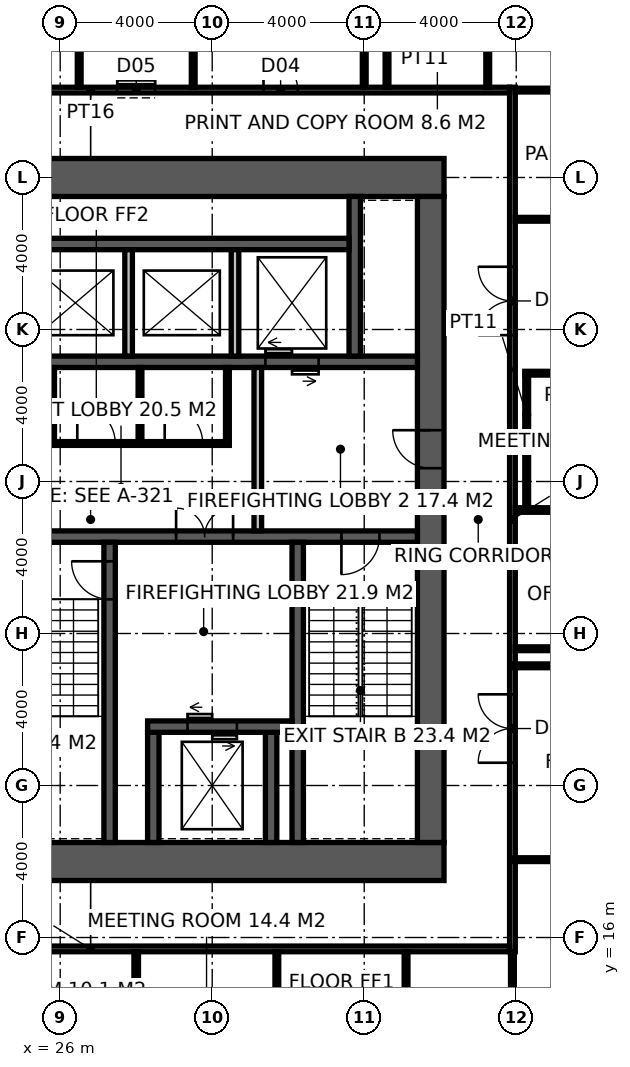
"""IFC4 building model, lengths in metres.
Left out: names, types, materials, properties, quantities, classifications, styles, units other than length and angle.
Written with IfcOpenShell. Run it as: python <this file> out.ifc"""

import sys

from ifc_helpers import new_model, si_unit, direction, frame, frame_2d, origin, place, context, subcontext, project, spatial, rectangle, extrude, element, fill, save


model = new_model("IFC4")
c1 = context("Model", 3, precision=1e-05, world=origin(), true_north=direction((0.0, 1.0)))
c2 = subcontext(c1, "Body", "Model", "MODEL_VIEW")
j1 = project(units=[si_unit("LENGTHUNIT", "METRE"), si_unit("PLANEANGLEUNIT", "RADIAN")], contexts=[c1])
p1 = place(None, origin())
s1 = spatial("IfcSite", under=j1, at=p1, CompositionType="ELEMENT")
p2 = place(p1, origin())
s2 = spatial("IfcBuilding", under=s1, at=p2, CompositionType="ELEMENT")
p3 = place(p2, frame((0.0, 0.0, 101.4)))
s3 = spatial("IfcBuildingStorey", under=s2, at=p3, CompositionType="ELEMENT", Elevation=101.4)
p4 = place(p3, frame((18.5, 18.0, -0.15), z_axis=(0.0, 0.0, 1.0), x_axis=(1.0, 0.0, 0.0)))
e1 = element("IfcWall", 1, at=p4, inside=s3, PredefinedType="SHEAR", context=c2, shape_type="SweptSolid", body=[
    extrude(rectangle(XDim=17.6, YDim=1.0, at=frame_2d((8.8, 0.0))), origin(), (0.0, 0.0, 1.0), 4.0),
])
p5 = place(p4, frame((3.45, 0.0, 0.15)))
e2 = element("IfcOpeningElement", 2, at=p5, cuts=e1, PredefinedType="OPENING", context=c2, shape_type="SweptSolid", body=[
    extrude(rectangle(XDim=1.5, YDim=2.4, at=frame_2d((0.75, 1.2))), frame((0.0, 0.51, 0.0), z_axis=(0.0, -1.0, 0.0), x_axis=(1.0, 0.0, 0.0)), (0.0, 0.0, 1.0), 1.02),
])
p6 = place(p3, frame((18.5, 36.0, -0.15), z_axis=(0.0, 0.0, 1.0), x_axis=(1.0, 0.0, 0.0)))
e3 = element("IfcWall", 3, at=p6, inside=s3, PredefinedType="SHEAR", context=c2, shape_type="SweptSolid", body=[
    extrude(rectangle(XDim=17.6, YDim=1.0, at=frame_2d((8.8, 0.0))), origin(), (0.0, 0.0, 1.0), 4.0),
])
p7 = place(p3, frame((35.75, 18.5, -0.15), z_axis=(0.0, 0.0, 1.0), x_axis=(0.0, 1.0, 0.0)))
e4 = element("IfcWall", 4, at=p7, inside=s3, PredefinedType="SHEAR", context=c2, shape_type="SweptSolid", body=[
    extrude(rectangle(XDim=17.0, YDim=0.7, at=frame_2d((8.5, 0.0))), origin(), (0.0, 0.0, 1.0), 4.0),
])
p8 = place(p7, frame((9.85, 0.0, 0.15)))
e5 = element("IfcOpeningElement", 5, at=p8, cuts=e4, PredefinedType="OPENING", context=c2, shape_type="SweptSolid", body=[
    extrude(rectangle(XDim=1.0, YDim=2.2, at=frame_2d((0.5, 1.1))), frame((0.0, 0.36, 0.0), z_axis=(0.0, -1.0, 0.0), x_axis=(1.0, 0.0, 0.0)), (0.0, 0.0, 1.0), 0.72),
])
p9 = place(p3, frame((24.15, 26.55, -0.15), z_axis=(0.0, 0.0, 1.0), x_axis=(1.0, 0.0, 0.0)))
e6 = element("IfcWall", 6, at=p9, inside=s3, PredefinedType="SHEAR", context=c2, shape_type="SweptSolid", body=[
    extrude(rectangle(XDim=11.25, YDim=0.3, at=frame_2d((5.625, 0.0))), origin(), (0.0, 0.0, 1.0), 4.0),
])
p10 = place(p9, frame((9.25, 0.0, 0.15)))
e7 = element("IfcOpeningElement", 7, at=p10, cuts=e6, PredefinedType="OPENING", context=c2, shape_type="SweptSolid", body=[
    extrude(rectangle(XDim=1.0, YDim=2.2, at=frame_2d((0.5, 1.1))), frame((0.0, 0.16, 0.0), z_axis=(0.0, -1.0, 0.0), x_axis=(1.0, 0.0, 0.0)), (0.0, 0.0, 1.0), 0.32),
])
p11 = place(p9, frame((4.9, 0.0, 0.15)))
e8 = element("IfcOpeningElement", 8, at=p11, cuts=e6, PredefinedType="OPENING", context=c2, shape_type="SweptSolid", body=[
    extrude(rectangle(XDim=1.5, YDim=2.4, at=frame_2d((0.75, 1.2))), frame((0.0, 0.16, 0.0), z_axis=(0.0, -1.0, 0.0), x_axis=(1.0, 0.0, 0.0)), (0.0, 0.0, 1.0), 0.32),
])
p12 = place(p3, frame((27.3, 18.5, -0.15), z_axis=(0.0, 0.0, 1.0), x_axis=(0.0, 1.0, 0.0)))
e9 = element("IfcWall", 9, at=p12, inside=s3, PredefinedType="SHEAR", context=c2, shape_type="SweptSolid", body=[
    extrude(rectangle(XDim=7.9, YDim=0.3, at=frame_2d((3.95, 0.0))), origin(), (0.0, 0.0, 1.0), 4.0),
])
p13 = place(p12, frame((6.4, 0.0, 0.15)))
e10 = element("IfcOpeningElement", 10, at=p13, cuts=e9, PredefinedType="OPENING", context=c2, shape_type="SweptSolid", body=[
    extrude(rectangle(XDim=1.0, YDim=2.2, at=frame_2d((0.5, 1.1))), frame((0.0, 0.16, 0.0), z_axis=(0.0, -1.0, 0.0), x_axis=(1.0, 0.0, 0.0)), (0.0, 0.0, 1.0), 0.32),
])
p14 = place(p3, frame((32.25, 18.5, -0.15), z_axis=(0.0, 0.0, 1.0), x_axis=(0.0, 1.0, 0.0)))
e11 = element("IfcWall", 11, at=p14, inside=s3, PredefinedType="SHEAR", context=c2, shape_type="SweptSolid", body=[
    extrude(rectangle(XDim=7.9, YDim=0.3, at=frame_2d((3.95, 0.0))), origin(), (0.0, 0.0, 1.0), 4.0),
])
for number, where, z_axis, x_axis in (
    (12, (28.45, 18.5, -0.15), (0.0, 0.0, 1.0), (0.0, 1.0, 0.0)),
    (13, (31.55, 18.5, -0.15), (0.0, 0.0, 1.0), (0.0, 1.0, 0.0)),
):
    element("IfcWall", number, at=place(p3, frame(where, z_axis=z_axis, x_axis=x_axis)), inside=s3, PredefinedType="SHEAR", context=c2, shape_type="SweptSolid", body=[
        extrude(rectangle(XDim=2.9, YDim=0.3, at=frame_2d((1.45, 0.0))), origin(), (0.0, 0.0, 1.0), 4.0),
    ])
p15 = place(p3, frame((28.3, 21.55, -0.15), z_axis=(0.0, 0.0, 1.0), x_axis=(1.0, 0.0, 0.0)))
e14 = element("IfcWall", 14, at=p15, inside=s3, PredefinedType="SHEAR", context=c2, shape_type="SweptSolid", body=[
    extrude(rectangle(XDim=3.8, YDim=0.3, at=frame_2d((1.9, 0.0))), origin(), (0.0, 0.0, 1.0), 4.0),
])
p16 = place(p15, frame((1.05, 0.0, 0.15)))
e15 = element("IfcOpeningElement", 15, at=p16, cuts=e14, PredefinedType="OPENING", context=c2, shape_type="SweptSolid", body=[
    extrude(rectangle(XDim=1.3, YDim=2.4, at=frame_2d((0.65, 1.2))), frame((0.0, 0.16, 0.0), z_axis=(0.0, -1.0, 0.0), x_axis=(1.0, 0.0, 0.0)), (0.0, 0.0, 1.0), 0.32),
])
p17 = place(p3, frame((24.15, 31.15, -0.15), z_axis=(0.0, 0.0, 1.0), x_axis=(1.0, 0.0, 0.0)))
e16 = element("IfcWall", 16, at=p17, inside=s3, PredefinedType="SHEAR", context=c2, shape_type="SweptSolid", body=[
    extrude(rectangle(XDim=11.25, YDim=0.3, at=frame_2d((5.625, 0.0))), origin(), (0.0, 0.0, 1.0), 4.0),
])
p18 = place(p17, frame((7.25, 0.0, 0.15)))
e17 = element("IfcOpeningElement", 17, at=p18, cuts=e16, PredefinedType="OPENING", context=c2, shape_type="SweptSolid", body=[
    extrude(rectangle(XDim=1.4, YDim=2.4, at=frame_2d((0.7, 1.2))), frame((0.0, 0.16, 0.0), z_axis=(0.0, -1.0, 0.0), x_axis=(1.0, 0.0, 0.0)), (0.0, 0.0, 1.0), 0.32),
])
p19 = place(p3, frame((33.75, 31.3, -0.15), z_axis=(0.0, 0.0, 1.0), x_axis=(0.0, 1.0, 0.0)))
e18 = element("IfcWall", 18, at=p19, inside=s3, PredefinedType="SHEAR", context=c2, shape_type="SweptSolid", body=[
    extrude(rectangle(XDim=4.2, YDim=0.3, at=frame_2d((2.1, 0.0))), origin(), (0.0, 0.0, 1.0), 4.0),
])
p20 = place(p3, frame((25.0, 34.25, -0.15), z_axis=(0.0, 0.0, 1.0), x_axis=(1.0, 0.0, 0.0)))
e19 = element("IfcWall", 19, at=p20, inside=s3, PredefinedType="SHEAR", context=c2, shape_type="SweptSolid", body=[
    extrude(rectangle(XDim=8.6, YDim=0.3, at=frame_2d((4.3, 0.0))), origin(), (0.0, 0.0, 1.0), 4.0),
])
for number, where, z_axis, x_axis in (
    (20, (27.8, 31.3, -0.15), (0.0, 0.0, 1.0), (0.0, 1.0, 0.0)),
    (21, (30.6, 31.3, -0.15), (0.0, 0.0, 1.0), (0.0, 1.0, 0.0)),
):
    element("IfcWall", number, at=place(p3, frame(where, z_axis=z_axis, x_axis=x_axis)), inside=s3, PredefinedType="SOLIDWALL", context=c2, shape_type="SweptSolid", body=[
        extrude(rectangle(XDim=2.8, YDim=0.2, at=frame_2d((1.4, 0.0))), origin(), (0.0, 0.0, 1.0), 4.0),
    ])
p21 = place(p3, frame((31.2, 26.7, 0.0), z_axis=(0.0, 0.0, 1.0), x_axis=(0.0, 1.0, 0.0)))
e22 = element("IfcWall", 22, at=p21, inside=s3, PredefinedType="SOLIDWALL", context=c2, shape_type="SweptSolid", body=[
    extrude(rectangle(XDim=4.3, YDim=0.2, at=frame_2d((2.15, 0.0))), origin(), (0.0, 0.0, 1.0), 3.85),
])
p22 = place(p3, frame((25.75, 29.0, 0.0), z_axis=(0.0, 0.0, 1.0), x_axis=(1.0, 0.0, 0.0)))
e23 = element("IfcWall", 23, at=p22, inside=s3, PredefinedType="PARTITIONING", context=c2, shape_type="SweptSolid", body=[
    extrude(rectangle(XDim=4.7, YDim=0.1, at=frame_2d((2.35, 0.0))), origin(), (0.0, 0.0, 1.0), 3.85),
])
p23 = place(p22, frame((0.7, 0.0, 0.0)))
e24 = element("IfcOpeningElement", 24, at=p23, cuts=e23, PredefinedType="OPENING", context=c2, shape_type="SweptSolid", body=[
    extrude(rectangle(XDim=1.0, YDim=2.2, at=frame_2d((0.5, 1.1))), frame((0.0, 0.06, 0.0), z_axis=(0.0, -1.0, 0.0), x_axis=(1.0, 0.0, 0.0)), (0.0, 0.0, 1.0), 0.12),
])
p24 = place(p22, frame((3.0, 0.0, 0.0)))
e25 = element("IfcOpeningElement", 25, at=p24, cuts=e23, PredefinedType="OPENING", context=c2, shape_type="SweptSolid", body=[
    extrude(rectangle(XDim=1.0, YDim=2.2, at=frame_2d((0.5, 1.1))), frame((0.0, 0.06, 0.0), z_axis=(0.0, -1.0, 0.0), x_axis=(1.0, 0.0, 0.0)), (0.0, 0.0, 1.0), 0.12),
])
for number, where, z_axis, x_axis in (
    (26, (25.8, 29.05, 0.0), (0.0, 0.0, 1.0), (0.0, 1.0, 0.0)),
    (27, (30.4, 29.05, 0.0), (0.0, 0.0, 1.0), (0.0, 1.0, 0.0)),
    (28, (28.1, 29.05, 0.0), (0.0, 0.0, 1.0), (0.0, 1.0, 0.0)),
):
    element("IfcWall", number, at=place(p3, frame(where, z_axis=z_axis, x_axis=x_axis)), inside=s3, PredefinedType="PARTITIONING", context=c2, shape_type="SweptSolid", body=[
        extrude(rectangle(XDim=1.95, YDim=0.1, at=frame_2d((0.975, 0.0))), origin(), (0.0, 0.0, 1.0), 3.85),
    ])
p25 = place(p3, frame((37.9, 15.625, 0.0), z_axis=(0.0, 0.0, 1.0), x_axis=(0.0, 1.0, 0.0)))
e29 = element("IfcWall", 29, at=p25, inside=s3, PredefinedType="PARTITIONING", context=c2, shape_type="SweptSolid", body=[
    extrude(rectangle(XDim=22.75, YDim=0.15, at=frame_2d((11.375, 0.0))), origin(), (0.0, 0.0, 1.0), 2.65),
])
p26 = place(p25, frame((4.974, 0.0, 0.0)))
e30 = element("IfcOpeningElement", 30, at=p26, cuts=e29, PredefinedType="OPENING", context=c2, shape_type="SweptSolid", body=[
    extrude(rectangle(XDim=1.8, YDim=2.4, at=frame_2d((0.9, 1.2))), frame((0.0, 0.085, 0.0), z_axis=(0.0, -1.0, 0.0), x_axis=(1.0, 0.0, 0.0)), (0.0, 0.0, 1.0), 0.17),
])
p27 = place(p25, frame((16.226, 0.0, 0.0)))
e31 = element("IfcOpeningElement", 31, at=p27, cuts=e29, PredefinedType="OPENING", context=c2, shape_type="SweptSolid", body=[
    extrude(rectangle(XDim=1.8, YDim=2.4, at=frame_2d((0.9, 1.2))), frame((0.0, 0.085, 0.0), z_axis=(0.0, -1.0, 0.0), x_axis=(1.0, 0.0, 0.0)), (0.0, 0.0, 1.0), 0.17),
])
p28 = place(p3, frame((15.775, 15.7, 0.0), z_axis=(0.0, 0.0, 1.0), x_axis=(1.0, 0.0, 0.0)))
e32 = element("IfcWall", 32, at=p28, inside=s3, PredefinedType="PARTITIONING", context=c2, shape_type="SweptSolid", body=[
    extrude(rectangle(XDim=22.05, YDim=0.15, at=frame_2d((11.025, 0.0))), origin(), (0.0, 0.0, 1.0), 3.85),
])
p29 = place(p3, frame((15.775, 38.3, 0.0), z_axis=(0.0, 0.0, 1.0), x_axis=(1.0, 0.0, 0.0)))
e33 = element("IfcWall", 33, at=p29, inside=s3, PredefinedType="PARTITIONING", context=c2, shape_type="SweptSolid", body=[
    extrude(rectangle(XDim=22.05, YDim=0.15, at=frame_2d((11.025, 0.0))), origin(), (0.0, 0.0, 1.0), 3.85),
])
p30 = place(p29, frame((7.975, 0.0, 0.0)))
e34 = element("IfcOpeningElement", 34, at=p30, cuts=e33, PredefinedType="OPENING", context=c2, shape_type="SweptSolid", body=[
    extrude(rectangle(XDim=0.9, YDim=2.1, at=frame_2d((0.45, 1.05))), frame((0.0, 0.085, 0.0), z_axis=(0.0, -1.0, 0.0), x_axis=(1.0, 0.0, 0.0)), (0.0, 0.0, 1.0), 0.17),
])
p31 = place(p29, frame((11.725, 0.0, 0.0)))
e35 = element("IfcOpeningElement", 35, at=p31, cuts=e33, PredefinedType="OPENING", context=c2, shape_type="SweptSolid", body=[
    extrude(rectangle(XDim=1.0, YDim=2.1, at=frame_2d((0.5, 1.05))), frame((0.0, 0.085, 0.0), z_axis=(0.0, -1.0, 0.0), x_axis=(1.0, 0.0, 0.0)), (0.0, 0.0, 1.0), 0.17),
])
p32 = place(p29, frame((15.575, 0.0, 0.0)))
e36 = element("IfcOpeningElement", 36, at=p32, cuts=e33, PredefinedType="OPENING", context=c2, shape_type="SweptSolid", body=[
    extrude(rectangle(XDim=0.9, YDim=2.1, at=frame_2d((0.45, 1.05))), frame((0.0, 0.085, 0.0), z_axis=(0.0, -1.0, 0.0), x_axis=(1.0, 0.0, 0.0)), (0.0, 0.0, 1.0), 0.17),
])
p33 = place(p3, frame((34.0, 38.375, 0.0), z_axis=(0.0, 0.0, 1.0), x_axis=(0.0, 1.0, 0.0)))
e37 = element("IfcWall", 37, at=p33, inside=s3, PredefinedType="PARTITIONING", context=c2, shape_type="SweptSolid", body=[
    extrude(rectangle(XDim=3.675, YDim=0.1, at=frame_2d((1.837, 0.0))), origin(), (0.0, 0.0, 1.0), 2.65),
])
for number, where, z_axis, x_axis in (
    (38, (26.5, 38.375, 0.0), (0.0, 0.0, 1.0), (0.0, 1.0, 0.0)),
    (39, (29.5, 38.375, 0.0), (0.0, 0.0, 1.0), (0.0, 1.0, 0.0)),
):
    element("IfcWall", number, at=place(p3, frame(where, z_axis=z_axis, x_axis=x_axis)), inside=s3, PredefinedType="PARTITIONING", context=c2, shape_type="SweptSolid", body=[
        extrude(rectangle(XDim=3.575, YDim=0.1, at=frame_2d((1.788, 0.0))), origin(), (0.0, 0.0, 1.0), 2.65),
    ])
p34 = place(p3, frame((28.0, 0.3, 0.0), z_axis=(0.0, 0.0, 1.0), x_axis=(0.0, 1.0, 0.0)))
e40 = element("IfcWall", 40, at=p34, inside=s3, PredefinedType="PARTITIONING", context=c2, shape_type="SweptSolid", body=[
    extrude(rectangle(XDim=15.325, YDim=0.12, at=frame_2d((7.663, 0.0))), origin(), (0.0, 0.0, 1.0), 3.85),
])
p35 = place(p3, frame((37.975, 27.25, 0.0), z_axis=(0.0, 0.0, 1.0), x_axis=(1.0, 0.0, 0.0)))
e41 = element("IfcWall", 41, at=p35, inside=s3, PredefinedType="PARTITIONING", context=c2, shape_type="SweptSolid", body=[
    extrude(rectangle(XDim=19.725, YDim=0.12, at=frame_2d((9.862, 0.0))), origin(), (0.0, 0.0, 1.0), 3.85),
])
p36 = place(p3, frame((37.975, 23.599, 0.0), z_axis=(0.0, 0.0, 1.0), x_axis=(1.0, 0.0, 0.0)))
e42 = element("IfcWall", 42, at=p36, inside=s3, PredefinedType="PARTITIONING", context=c2, shape_type="SweptSolid", body=[
    extrude(rectangle(XDim=4.775, YDim=0.1, at=frame_2d((2.387, 0.0))), origin(), (0.0, 0.0, 1.0), 2.65),
])
p37 = place(p3, frame((38.225, 30.85, 0.0), z_axis=(0.0, 0.0, 1.0), x_axis=(1.0, 0.0, 0.0)))
e43 = element("IfcWall", 43, at=p37, inside=s3, PredefinedType="PARTITIONING", context=c2, shape_type="SweptSolid", body=[
    extrude(rectangle(XDim=3.8, YDim=0.1, at=frame_2d((1.9, 0.0))), origin(), (0.0, 0.0, 1.0), 3.85),
])
p38 = place(p37, frame((1.4, 0.0, 0.0)))
e44 = element("IfcOpeningElement", 44, at=p38, cuts=e43, PredefinedType="OPENING", context=c2, shape_type="SweptSolid", body=[
    extrude(rectangle(XDim=1.0, YDim=2.2, at=frame_2d((0.5, 1.1))), frame((0.0, 0.06, 0.0), z_axis=(0.0, -1.0, 0.0), x_axis=(1.0, 0.0, 0.0)), (0.0, 0.0, 1.0), 0.12),
])
for number, where, z_axis, x_axis in (
    (45, (37.975, 34.9, 0.0), (0.0, 0.0, 1.0), (1.0, 0.0, 0.0)),
    (46, (37.975, 38.3, 0.0), (0.0, 0.0, 1.0), (1.0, 0.0, 0.0)),
):
    element("IfcWall", number, at=place(p3, frame(where, z_axis=z_axis, x_axis=x_axis)), inside=s3, PredefinedType="PARTITIONING", context=c2, shape_type="SweptSolid", body=[
        extrude(rectangle(XDim=4.775, YDim=0.1, at=frame_2d((2.387, 0.0))), origin(), (0.0, 0.0, 1.0), 3.85),
    ])
p39 = place(p3, frame((31.701, 11.55, 0.0), z_axis=(0.0, 0.0, 1.0), x_axis=(0.0, 1.0, 0.0)))
e47 = element("IfcWall", 47, at=p39, inside=s3, PredefinedType="PARTITIONING", context=c2, shape_type="SweptSolid", body=[
    extrude(rectangle(XDim=4.075, YDim=0.1, at=frame_2d((2.038, 0.0))), origin(), (0.0, 0.0, 1.0), 3.85),
])
p40 = place(p3, frame((34.6, 38.375, 0.0), z_axis=(0.0, 0.0, 1.0), x_axis=(0.0, 1.0, 0.0)))
e48 = element("IfcWall", 48, at=p40, inside=s3, PredefinedType="PARTITIONING", context=c2, shape_type="SweptSolid", body=[
    extrude(rectangle(XDim=3.475, YDim=0.1, at=frame_2d((1.738, 0.0))), origin(), (0.0, 0.0, 1.0), 2.65),
])
p41 = place(p3, frame((35.101, 11.55, 0.0), z_axis=(0.0, 0.0, 1.0), x_axis=(0.0, 1.0, 0.0)))
e49 = element("IfcWall", 49, at=p41, inside=s3, PredefinedType="PARTITIONING", context=c2, shape_type="SweptSolid", body=[
    extrude(rectangle(XDim=4.075, YDim=0.1, at=frame_2d((2.038, 0.0))), origin(), (0.0, 0.0, 1.0), 3.85),
])
p42 = place(p3, frame((37.25, 38.375, 0.0), z_axis=(0.0, 0.0, 1.0), x_axis=(0.0, 1.0, 0.0)))
e50 = element("IfcWall", 50, at=p42, inside=s3, PredefinedType="PARTITIONING", context=c2, shape_type="SweptSolid", body=[
    extrude(rectangle(XDim=3.475, YDim=0.1, at=frame_2d((1.738, 0.0))), origin(), (0.0, 0.0, 1.0), 3.85),
])
p43 = place(p3, frame((37.9, 11.55, 0.0), z_axis=(0.0, 0.0, 1.0), x_axis=(0.0, 1.0, 0.0)))
e51 = element("IfcWall", 51, at=p43, inside=s3, PredefinedType="PARTITIONING", context=c2, shape_type="SweptSolid", body=[
    extrude(rectangle(XDim=4.075, YDim=0.1, at=frame_2d((2.038, 0.0))), origin(), (0.0, 0.0, 1.0), 2.65),
])
p44 = place(p3, frame((38.275, 27.31, 0.0), z_axis=(0.0, 0.0, 1.0), x_axis=(0.0, 1.0, 0.0)))
e52 = element("IfcWall", 52, at=p44, inside=s3, PredefinedType="PARTITIONING", context=c2, shape_type="SweptSolid", body=[
    extrude(rectangle(XDim=3.49, YDim=0.1, at=frame_2d((1.745, 0.0))), origin(), (0.0, 0.0, 1.0), 3.85),
])
for number, where, z_axis, x_axis in (
    (53, (37.9, 18.049, 0.0), (0.0, 0.0, 1.0), (1.0, 0.0, 0.0)),
    (54, (42.4, 23.149, 0.0), (0.0, 0.0, 1.0), (-1.0, 0.0, 0.0)),
):
    element("IfcWall", number, at=place(p3, frame(where, z_axis=z_axis, x_axis=x_axis)), inside=s3, PredefinedType="PARTITIONING", context=c2, shape_type="SweptSolid", body=[
        extrude(rectangle(XDim=4.5, YDim=0.1, at=frame_2d((2.25, 0.0))), origin(), (0.0, 0.0, 1.0), 3.85),
    ])
p45 = place(p13, origin())
e55 = element("IfcDoor", 55, at=p45, inside=s3, OperationType="SINGLE_SWING_RIGHT", PredefinedType="DOOR", context=c2, shape_type="SweptSolid", body=[
    extrude(rectangle(XDim=1.0, YDim=2.2, at=frame_2d((0.5, 1.1))), frame((0.0, 0.025, 0.0), z_axis=(0.0, -1.0, 0.0), x_axis=(1.0, 0.0, 0.0)), (0.0, 0.0, 1.0), 0.05),
])
fill(e10, e55)
p46 = place(p10, frame((1.0, 0.0, 0.0), z_axis=(0.0, 0.0, 1.0), x_axis=(-1.0, 0.0, 0.0)))
e56 = element("IfcDoor", 56, at=p46, inside=s3, OperationType="SINGLE_SWING_RIGHT", PredefinedType="DOOR", context=c2, shape_type="SweptSolid", body=[
    extrude(rectangle(XDim=1.0, YDim=2.2, at=frame_2d((0.5, 1.1))), frame((0.0, 0.025, 0.0), z_axis=(0.0, -1.0, 0.0), x_axis=(1.0, 0.0, 0.0)), (0.0, 0.0, 1.0), 0.05),
])
fill(e7, e56)
p47 = place(p8, origin())
e57 = element("IfcDoor", 57, at=p47, inside=s3, OperationType="SINGLE_SWING_RIGHT", PredefinedType="DOOR", context=c2, shape_type="SweptSolid", body=[
    extrude(rectangle(XDim=1.0, YDim=2.2, at=frame_2d((0.5, 1.1))), frame((0.0, 0.025, 0.0), z_axis=(0.0, -1.0, 0.0), x_axis=(1.0, 0.0, 0.0)), (0.0, 0.0, 1.0), 0.05),
])
fill(e5, e57)
p48 = place(p11, origin())
e58 = element("IfcDoor", 58, at=p48, inside=s3, OperationType="DOUBLE_DOOR_DOUBLE_SWING", PredefinedType="DOOR", context=c2, shape_type="SweptSolid", body=[
    extrude(rectangle(XDim=1.5, YDim=2.4, at=frame_2d((0.75, 1.2))), frame((0.0, 0.025, 0.0), z_axis=(0.0, -1.0, 0.0), x_axis=(1.0, 0.0, 0.0)), (0.0, 0.0, 1.0), 0.05),
])
fill(e8, e58)
p49 = place(p23, origin())
e59 = element("IfcDoor", 59, at=p49, inside=s3, OperationType="SINGLE_SWING_LEFT", PredefinedType="DOOR", context=c2, shape_type="SweptSolid", body=[
    extrude(rectangle(XDim=1.0, YDim=2.2, at=frame_2d((0.5, 1.1))), frame((0.0, 0.025, 0.0), z_axis=(0.0, -1.0, 0.0), x_axis=(1.0, 0.0, 0.0)), (0.0, 0.0, 1.0), 0.05),
])
fill(e24, e59)
p50 = place(p24, origin())
e60 = element("IfcDoor", 60, at=p50, inside=s3, OperationType="SINGLE_SWING_LEFT", PredefinedType="DOOR", context=c2, shape_type="SweptSolid", body=[
    extrude(rectangle(XDim=1.0, YDim=2.2, at=frame_2d((0.5, 1.1))), frame((0.0, 0.025, 0.0), z_axis=(0.0, -1.0, 0.0), x_axis=(1.0, 0.0, 0.0)), (0.0, 0.0, 1.0), 0.05),
])
fill(e25, e60)
p51 = place(p31, origin())
e61 = element("IfcDoor", 61, at=p51, inside=s3, OperationType="SLIDING_TO_LEFT", PredefinedType="DOOR", context=c2, shape_type="SweptSolid", body=[
    extrude(rectangle(XDim=1.0, YDim=2.1, at=frame_2d((0.5, 1.05))), frame((0.0, 0.025, 0.0), z_axis=(0.0, -1.0, 0.0), x_axis=(1.0, 0.0, 0.0)), (0.0, 0.0, 1.0), 0.05),
])
fill(e35, e61)
p52 = place(p32, origin())
e62 = element("IfcDoor", 62, at=p52, inside=s3, OperationType="SINGLE_SWING_LEFT", PredefinedType="DOOR", context=c2, shape_type="SweptSolid", body=[
    extrude(rectangle(XDim=0.9, YDim=2.1, at=frame_2d((0.45, 1.05))), frame((0.0, 0.025, 0.0), z_axis=(0.0, -1.0, 0.0), x_axis=(1.0, 0.0, 0.0)), (0.0, 0.0, 1.0), 0.05),
])
fill(e36, e62)
p53 = place(p26, origin())
e63 = element("IfcDoor", 63, at=p53, inside=s3, OperationType="DOUBLE_DOOR_DOUBLE_SWING", PredefinedType="DOOR", context=c2, shape_type="SweptSolid", body=[
    extrude(rectangle(XDim=1.8, YDim=2.4, at=frame_2d((0.9, 1.2))), frame((0.0, 0.025, 0.0), z_axis=(0.0, -1.0, 0.0), x_axis=(1.0, 0.0, 0.0)), (0.0, 0.0, 1.0), 0.05),
])
fill(e30, e63)
p54 = place(p27, origin())
e64 = element("IfcDoor", 64, at=p54, inside=s3, OperationType="DOUBLE_DOOR_DOUBLE_SWING", PredefinedType="DOOR", context=c2, shape_type="SweptSolid", body=[
    extrude(rectangle(XDim=1.8, YDim=2.4, at=frame_2d((0.9, 1.2))), frame((0.0, 0.025, 0.0), z_axis=(0.0, -1.0, 0.0), x_axis=(1.0, 0.0, 0.0)), (0.0, 0.0, 1.0), 0.05),
])
fill(e31, e64)
p55 = place(p16, origin())
e65 = element("IfcDoor", 65, at=p55, inside=s3, OperationType="DOUBLE_DOOR_SLIDING", PredefinedType="DOOR", context=c2, shape_type="SweptSolid", body=[
    extrude(rectangle(XDim=1.3, YDim=2.4, at=frame_2d((0.65, 1.2))), frame((0.0, 0.025, 0.0), z_axis=(0.0, -1.0, 0.0), x_axis=(1.0, 0.0, 0.0)), (0.0, 0.0, 1.0), 0.05),
])
fill(e15, e65)
p56 = place(p18, origin())
e66 = element("IfcDoor", 66, at=p56, inside=s3, OperationType="DOUBLE_DOOR_SLIDING", PredefinedType="DOOR", context=c2, shape_type="SweptSolid", body=[
    extrude(rectangle(XDim=1.4, YDim=2.4, at=frame_2d((0.7, 1.2))), frame((0.0, 0.025, 0.0), z_axis=(0.0, -1.0, 0.0), x_axis=(1.0, 0.0, 0.0)), (0.0, 0.0, 1.0), 0.05),
])
fill(e17, e66)
save(model, sys.argv[1])
